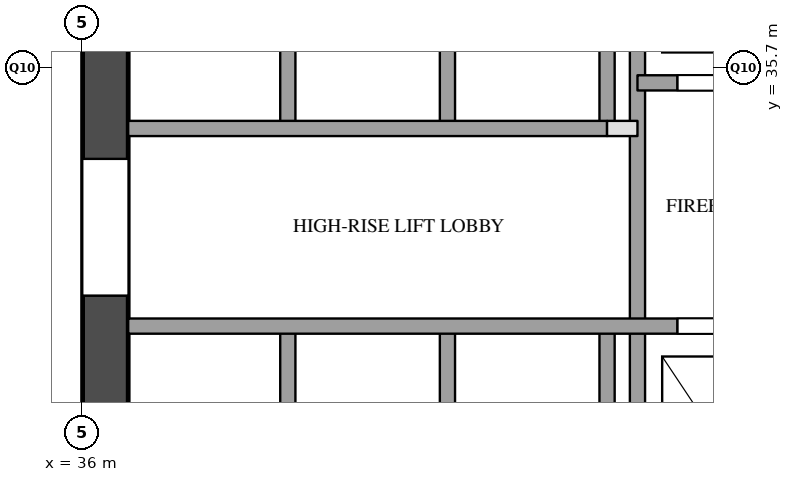
"""IFC4 building model, lengths in metres.
Left out: names, types, materials, properties, quantities, classifications, styles, units other than length and angle.
Written with IfcOpenShell. Run it as: python <this file> out.ifc"""

import sys

from ifc_helpers import new_model, si_unit, direction, frame, frame_2d, origin, place, context, subcontext, project, spatial, rectangle, extrude, element, fill, save


model = new_model("IFC4")
c1 = context("Model", 3, precision=1e-05, world=origin(), true_north=direction((0.0, 1.0)))
c2 = subcontext(c1, "Body", "Model", "MODEL_VIEW")
j1 = project(units=[si_unit("LENGTHUNIT", "METRE"), si_unit("PLANEANGLEUNIT", "RADIAN")], contexts=[c1])
p1 = place(None, origin())
s1 = spatial("IfcSite", under=j1, at=p1, CompositionType="ELEMENT")
p2 = place(p1, origin())
s2 = spatial("IfcBuilding", under=s1, at=p2, CompositionType="ELEMENT")
p3 = place(p2, frame((0.0, 0.0, 34.8)))
s3 = spatial("IfcBuildingStorey", under=s2, at=p3, CompositionType="ELEMENT", Elevation=34.8)
p4 = place(p3, frame((36.3, 29.1, 0.0), z_axis=(0.0, 0.0, 1.0), x_axis=(0.0, 1.0, 0.0)))
e1 = element("IfcWall", 1, at=p4, inside=s3, PredefinedType="SHEAR", context=c2, shape_type="SweptSolid", body=[
    extrude(rectangle(XDim=20.3, YDim=0.6, at=frame_2d((10.15, 0.0))), origin(), (0.0, 0.0, 1.0), 3.5),
])
p5 = place(p4, frame((3.6, 0.0, 0.0)))
e2 = element("IfcOpeningElement", 2, at=p5, cuts=e1, PredefinedType="OPENING", context=c2, shape_type="SweptSolid", body=[
    extrude(rectangle(XDim=1.8, YDim=2.1, at=frame_2d((0.9, 1.05))), frame((0.0, 0.31, 0.0), z_axis=(0.0, -1.0, 0.0), x_axis=(1.0, 0.0, 0.0)), (0.0, 0.0, 1.0), 0.62),
])
p6 = place(p4, frame((16.4, 0.0, 0.0)))
e3 = element("IfcOpeningElement", 3, at=p6, cuts=e1, PredefinedType="OPENING", context=c2, shape_type="SweptSolid", body=[
    extrude(rectangle(XDim=1.0, YDim=2.1, at=frame_2d((0.5, 1.05))), frame((0.0, 0.31, 0.0), z_axis=(0.0, -1.0, 0.0), x_axis=(1.0, 0.0, 0.0)), (0.0, 0.0, 1.0), 0.62),
])
p7 = place(p3, frame((38.7, 29.1, 0.0), z_axis=(0.0, 0.0, 1.0), x_axis=(0.0, 1.0, 0.0)))
e4 = element("IfcWall", 4, at=p7, inside=s3, PredefinedType="SOLIDWALL", context=c2, shape_type="SweptSolid", body=[
    extrude(rectangle(XDim=3.2, YDim=0.2, at=frame_2d((1.6, 0.0))), origin(), (0.0, 0.0, 1.0), 3.5),
])
p8 = place(p3, frame((38.7, 34.9, 0.0), z_axis=(0.0, 0.0, 1.0), x_axis=(0.0, 1.0, 0.0)))
e5 = element("IfcWall", 5, at=p8, inside=s3, PredefinedType="SOLIDWALL", context=c2, shape_type="SweptSolid", body=[
    extrude(rectangle(XDim=3.2, YDim=0.2, at=frame_2d((1.6, 0.0))), origin(), (0.0, 0.0, 1.0), 3.5),
])
p9 = place(p3, frame((40.8, 29.1, 0.0), z_axis=(0.0, 0.0, 1.0), x_axis=(0.0, 1.0, 0.0)))
e6 = element("IfcWall", 6, at=p9, inside=s3, PredefinedType="SOLIDWALL", context=c2, shape_type="SweptSolid", body=[
    extrude(rectangle(XDim=3.2, YDim=0.2, at=frame_2d((1.6, 0.0))), origin(), (0.0, 0.0, 1.0), 3.5),
])
p10 = place(p3, frame((40.8, 34.9, 0.0), z_axis=(0.0, 0.0, 1.0), x_axis=(0.0, 1.0, 0.0)))
e7 = element("IfcWall", 7, at=p10, inside=s3, PredefinedType="SOLIDWALL", context=c2, shape_type="SweptSolid", body=[
    extrude(rectangle(XDim=3.2, YDim=0.2, at=frame_2d((1.6, 0.0))), origin(), (0.0, 0.0, 1.0), 3.5),
])
p11 = place(p3, frame((42.9, 29.1, 0.0), z_axis=(0.0, 0.0, 1.0), x_axis=(0.0, 1.0, 0.0)))
e8 = element("IfcWall", 8, at=p11, inside=s3, PredefinedType="SOLIDWALL", context=c2, shape_type="SweptSolid", body=[
    extrude(rectangle(XDim=3.2, YDim=0.2, at=frame_2d((1.6, 0.0))), origin(), (0.0, 0.0, 1.0), 3.5),
])
p12 = place(p3, frame((42.9, 34.9, 0.0), z_axis=(0.0, 0.0, 1.0), x_axis=(0.0, 1.0, 0.0)))
e9 = element("IfcWall", 9, at=p12, inside=s3, PredefinedType="SOLIDWALL", context=c2, shape_type="SweptSolid", body=[
    extrude(rectangle(XDim=3.2, YDim=0.2, at=frame_2d((1.6, 0.0))), origin(), (0.0, 0.0, 1.0), 3.5),
])
p13 = place(p3, frame((43.3, 29.1, 0.0), z_axis=(0.0, 0.0, 1.0), x_axis=(0.0, 1.0, 0.0)))
e10 = element("IfcWall", 10, at=p13, inside=s3, PredefinedType="SOLIDWALL", context=c2, shape_type="SweptSolid", body=[
    extrude(rectangle(XDim=9.9, YDim=0.2, at=frame_2d((4.95, 0.0))), origin(), (0.0, 0.0, 1.0), 3.5),
])
p14 = place(p3, frame((36.6, 32.3, 0.0), z_axis=(0.0, 0.0, 1.0), x_axis=(1.0, 0.0, 0.0)))
e11 = element("IfcWall", 11, at=p14, inside=s3, PredefinedType="SOLIDWALL", context=c2, shape_type="SweptSolid", body=[
    extrude(rectangle(XDim=11.2, YDim=0.2, at=frame_2d((5.6, 0.0))), origin(), (0.0, 0.0, 1.0), 3.5),
])
p15 = place(p14, frame((7.225, 0.0, 0.0)))
e12 = element("IfcOpeningElement", 12, at=p15, cuts=e11, PredefinedType="OPENING", context=c2, shape_type="SweptSolid", body=[
    extrude(rectangle(XDim=1.2, YDim=2.1, at=frame_2d((0.6, 1.05))), frame((0.0, 0.11, 0.0), z_axis=(0.0, -1.0, 0.0), x_axis=(1.0, 0.0, 0.0)), (0.0, 0.0, 1.0), 0.22),
])
p16 = place(p14, frame((9.475, 0.0, 0.0)))
e13 = element("IfcOpeningElement", 13, at=p16, cuts=e11, PredefinedType="OPENING", context=c2, shape_type="SweptSolid", body=[
    extrude(rectangle(XDim=1.2, YDim=2.1, at=frame_2d((0.6, 1.05))), frame((0.0, 0.11, 0.0), z_axis=(0.0, -1.0, 0.0), x_axis=(1.0, 0.0, 0.0)), (0.0, 0.0, 1.0), 0.22),
])
p17 = place(p3, frame((42.9, 34.9, 0.0), z_axis=(0.0, 0.0, 1.0), x_axis=(1.0, 0.0, 0.0)))
e14 = element("IfcWall", 14, at=p17, inside=s3, PredefinedType="PARTITIONING", context=c2, shape_type="SweptSolid", body=[
    extrude(rectangle(XDim=0.4, YDim=0.2, at=frame_2d((0.2, 0.0))), origin(), (0.0, 0.0, 1.0), 3.5),
])
p18 = place(p3, frame((36.6, 34.9, 0.0), z_axis=(0.0, 0.0, 1.0), x_axis=(1.0, 0.0, 0.0)))
e15 = element("IfcWall", 15, at=p18, inside=s3, PredefinedType="SOLIDWALL", context=c2, shape_type="SweptSolid", body=[
    extrude(rectangle(XDim=6.3, YDim=0.2, at=frame_2d((3.15, 0.0))), origin(), (0.0, 0.0, 1.0), 3.5),
])
p19 = place(p3, frame((43.3, 35.5, 0.0), z_axis=(0.0, 0.0, 1.0), x_axis=(1.0, 0.0, 0.0)))
e16 = element("IfcWall", 16, at=p19, inside=s3, PredefinedType="SOLIDWALL", context=c2, shape_type="SweptSolid", body=[
    extrude(rectangle(XDim=4.5, YDim=0.2, at=frame_2d((2.25, 0.0))), origin(), (0.0, 0.0, 1.0), 3.5),
])
p20 = place(p19, frame((0.525, 0.0, 0.0)))
e17 = element("IfcOpeningElement", 17, at=p20, cuts=e16, PredefinedType="OPENING", context=c2, shape_type="SweptSolid", body=[
    extrude(rectangle(XDim=1.2, YDim=2.1, at=frame_2d((0.6, 1.05))), frame((0.0, 0.11, 0.0), z_axis=(0.0, -1.0, 0.0), x_axis=(1.0, 0.0, 0.0)), (0.0, 0.0, 1.0), 0.22),
])
p21 = place(p19, frame((3.025, 0.0, 0.0)))
e18 = element("IfcOpeningElement", 18, at=p21, cuts=e16, PredefinedType="OPENING", context=c2, shape_type="SweptSolid", body=[
    extrude(rectangle(XDim=0.7, YDim=2.1, at=frame_2d((0.35, 1.05))), frame((0.0, 0.11, 0.0), z_axis=(0.0, -1.0, 0.0), x_axis=(1.0, 0.0, 0.0)), (0.0, 0.0, 1.0), 0.22),
])
p22 = place(p15, origin())
e19 = element("IfcDoor", 19, at=p22, inside=s3, OperationType="SLIDING_TO_LEFT", PredefinedType="DOOR", context=c2, shape_type="SweptSolid", body=[
    extrude(rectangle(XDim=1.2, YDim=2.1, at=frame_2d((0.6, 1.05))), frame((0.0, 0.025, 0.0), z_axis=(0.0, -1.0, 0.0), x_axis=(1.0, 0.0, 0.0)), (0.0, 0.0, 1.0), 0.05),
])
fill(e12, e19)
p23 = place(p20, origin())
e20 = element("IfcDoor", 20, at=p23, inside=s3, OperationType="SLIDING_TO_LEFT", PredefinedType="DOOR", context=c2, shape_type="SweptSolid", body=[
    extrude(rectangle(XDim=1.2, YDim=2.1, at=frame_2d((0.6, 1.05))), frame((0.0, 0.025, 0.0), z_axis=(0.0, -1.0, 0.0), x_axis=(1.0, 0.0, 0.0)), (0.0, 0.0, 1.0), 0.05),
])
fill(e17, e20)
p24 = place(p5, origin())
e21 = element("IfcDoor", 21, at=p24, inside=s3, OperationType="DOUBLE_DOOR_SINGLE_SWING", PredefinedType="DOOR", context=c2, shape_type="SweptSolid", body=[
    extrude(rectangle(XDim=1.8, YDim=2.1, at=frame_2d((0.9, 1.05))), frame((0.0, 0.025, 0.0), z_axis=(0.0, -1.0, 0.0), x_axis=(1.0, 0.0, 0.0)), (0.0, 0.0, 1.0), 0.05),
])
fill(e2, e21)
save(model, sys.argv[1])
